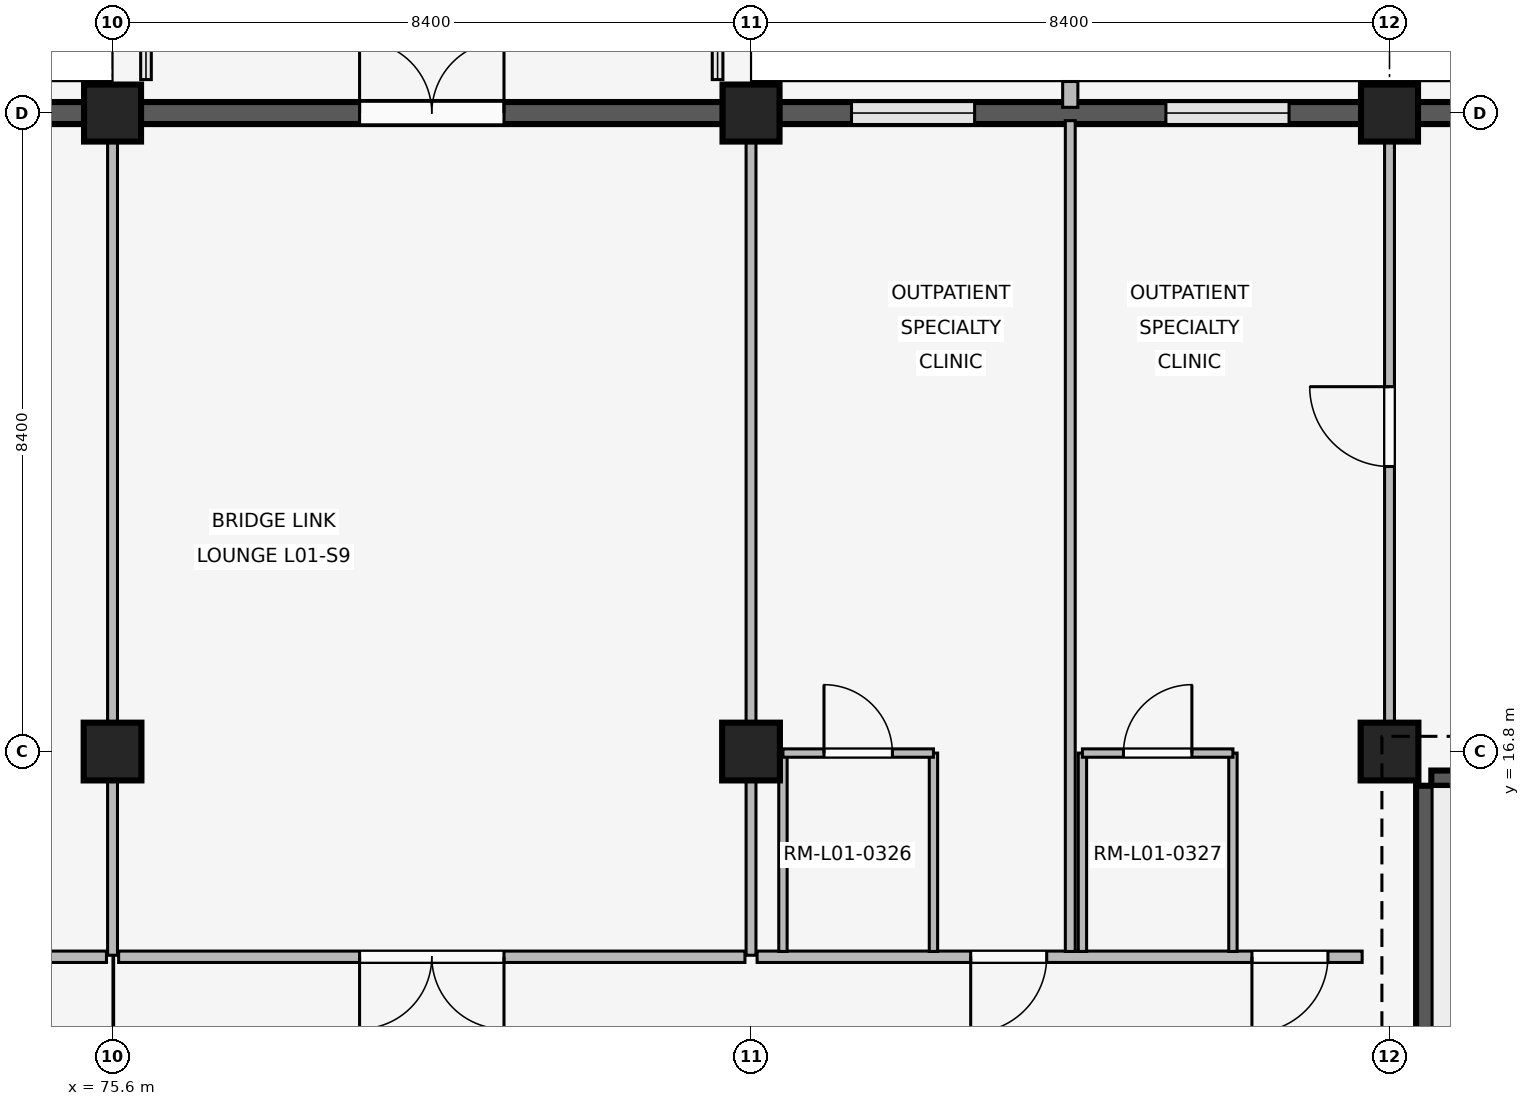
"""IFC4 building model, lengths in metres.
Left out: names, types, materials, properties, quantities, classifications, styles, units other than length and angle.
Written with IfcOpenShell. Run it as: python <this file> out.ifc"""

import sys

from ifc_helpers import new_model, si_unit, direction, frame, frame_2d, origin, origin_2d, place, context, subcontext, project, spatial, rectangle, extrude, element, fill, save


model = new_model("IFC4")
c1 = context("Model", 3, precision=1e-05, world=origin(), true_north=direction((0.0, 1.0)))
c2 = subcontext(c1, "Body", "Model", "MODEL_VIEW")
j1 = project(units=[si_unit("LENGTHUNIT", "METRE"), si_unit("PLANEANGLEUNIT", "RADIAN")], contexts=[c1])
p1 = place(None, origin())
s1 = spatial("IfcSite", under=j1, at=p1, CompositionType="ELEMENT")
p2 = place(p1, origin())
s2 = spatial("IfcBuilding", under=s1, at=p2, CompositionType="ELEMENT")
p3 = place(p2, frame((0.0, 0.0, 4.8)))
s3 = spatial("IfcBuildingStorey", under=s2, at=p3, CompositionType="ELEMENT", Elevation=4.8)
p4 = place(p3, frame((75.6, 16.8, 0.0), z_axis=(0.0, 0.0, 1.0), x_axis=(1.0, 0.0, 0.0)))
e1 = element("IfcColumn", 1, at=p4, inside=s3, PredefinedType="COLUMN", context=c2, shape_type="SweptSolid", body=[
    extrude(rectangle(XDim=0.76, YDim=0.76, at=origin_2d()), origin(), (0.0, 0.0, 1.0), 3.3),
])
p5 = place(p3, frame((75.6, 25.2, 0.0), z_axis=(0.0, 0.0, 1.0), x_axis=(1.0, 0.0, 0.0)))
e2 = element("IfcColumn", 2, at=p5, inside=s3, PredefinedType="COLUMN", context=c2, shape_type="SweptSolid", body=[
    extrude(rectangle(XDim=0.75, YDim=0.75, at=origin_2d()), origin(), (0.0, 0.0, 1.0), 3.3),
])
p6 = place(p3, frame((84.0, 16.8, 0.0), z_axis=(0.0, 0.0, 1.0), x_axis=(1.0, 0.0, 0.0)))
e3 = element("IfcColumn", 3, at=p6, inside=s3, PredefinedType="COLUMN", context=c2, shape_type="SweptSolid", body=[
    extrude(rectangle(XDim=0.76, YDim=0.76, at=origin_2d()), origin(), (0.0, 0.0, 1.0), 3.3),
])
p7 = place(p3, frame((84.0, 25.2, 0.0), z_axis=(0.0, 0.0, 1.0), x_axis=(1.0, 0.0, 0.0)))
e4 = element("IfcColumn", 4, at=p7, inside=s3, PredefinedType="COLUMN", context=c2, shape_type="SweptSolid", body=[
    extrude(rectangle(XDim=0.75, YDim=0.75, at=origin_2d()), origin(), (0.0, 0.0, 1.0), 3.3),
])
p8 = place(p3, frame((92.4, 16.8, 0.0), z_axis=(0.0, 0.0, 1.0), x_axis=(1.0, 0.0, 0.0)))
e5 = element("IfcColumn", 5, at=p8, inside=s3, PredefinedType="COLUMN", context=c2, shape_type="SweptSolid", body=[
    extrude(rectangle(XDim=0.76, YDim=0.76, at=origin_2d()), origin(), (0.0, 0.0, 1.0), 3.3),
])
p9 = place(p3, frame((92.4, 25.2, 0.0), z_axis=(0.0, 0.0, 1.0), x_axis=(1.0, 0.0, 0.0)))
e6 = element("IfcColumn", 6, at=p9, inside=s3, PredefinedType="COLUMN", context=c2, shape_type="SweptSolid", body=[
    extrude(rectangle(XDim=0.75, YDim=0.75, at=origin_2d()), origin(), (0.0, 0.0, 1.0), 3.3),
])
p10 = place(p3, frame((67.57, 25.2, 0.0), z_axis=(0.0, 0.0, 1.0), x_axis=(1.0, 0.0, 0.0)))
e7 = element("IfcWall", 7, at=p10, inside=s3, PredefinedType="SOLIDWALL", context=c2, shape_type="SweptSolid", body=[
    extrude(rectangle(XDim=7.66, YDim=0.29, at=frame_2d((3.83, 0.0))), origin(), (0.0, 0.0, 1.0), 2.42),
])
p11 = place(p10, frame((0.952, 0.0, 0.85)))
e8 = element("IfcOpeningElement", 8, at=p11, cuts=e7, PredefinedType="OPENING", context=c2, shape_type="SweptSolid", body=[
    extrude(rectangle(XDim=1.62, YDim=0.95, at=frame_2d((0.81, 0.475))), frame((0.0, 0.155, 0.0), z_axis=(0.0, -1.0, 0.0), x_axis=(1.0, 0.0, 0.0)), (0.0, 0.0, 1.0), 0.31),
])
p12 = place(p10, frame((5.088, 0.0, 0.85)))
e9 = element("IfcOpeningElement", 9, at=p12, cuts=e7, PredefinedType="OPENING", context=c2, shape_type="SweptSolid", body=[
    extrude(rectangle(XDim=1.62, YDim=0.95, at=frame_2d((0.81, 0.475))), frame((0.0, 0.155, 0.0), z_axis=(0.0, -1.0, 0.0), x_axis=(1.0, 0.0, 0.0)), (0.0, 0.0, 1.0), 0.31),
])
p13 = place(p3, frame((75.97, 25.2, 0.0), z_axis=(0.0, 0.0, 1.0), x_axis=(1.0, 0.0, 0.0)))
e10 = element("IfcWall", 10, at=p13, inside=s3, PredefinedType="SOLIDWALL", context=c2, shape_type="SweptSolid", body=[
    extrude(rectangle(XDim=7.66, YDim=0.29, at=frame_2d((3.83, 0.0))), origin(), (0.0, 0.0, 1.0), 2.42),
])
p14 = place(p13, frame((2.88, 0.0, 0.0)))
e11 = element("IfcOpeningElement", 11, at=p14, cuts=e10, PredefinedType="OPENING", context=c2, shape_type="SweptSolid", body=[
    extrude(rectangle(XDim=1.9, YDim=2.3, at=frame_2d((0.95, 1.15))), frame((0.0, 0.155, 0.0), z_axis=(0.0, -1.0, 0.0), x_axis=(1.0, 0.0, 0.0)), (0.0, 0.0, 1.0), 0.31),
])
p15 = place(p3, frame((84.37, 25.2, 0.0), z_axis=(0.0, 0.0, 1.0), x_axis=(1.0, 0.0, 0.0)))
e12 = element("IfcWall", 12, at=p15, inside=s3, PredefinedType="SOLIDWALL", context=c2, shape_type="SweptSolid", body=[
    extrude(rectangle(XDim=7.66, YDim=0.29, at=frame_2d((3.83, 0.0))), origin(), (0.0, 0.0, 1.0), 2.42),
])
p16 = place(p15, frame((0.952, 0.0, 0.85)))
e13 = element("IfcOpeningElement", 13, at=p16, cuts=e12, PredefinedType="OPENING", context=c2, shape_type="SweptSolid", body=[
    extrude(rectangle(XDim=1.62, YDim=0.95, at=frame_2d((0.81, 0.475))), frame((0.0, 0.155, 0.0), z_axis=(0.0, -1.0, 0.0), x_axis=(1.0, 0.0, 0.0)), (0.0, 0.0, 1.0), 0.31),
])
p17 = place(p15, frame((5.088, 0.0, 0.85)))
e14 = element("IfcOpeningElement", 14, at=p17, cuts=e12, PredefinedType="OPENING", context=c2, shape_type="SweptSolid", body=[
    extrude(rectangle(XDim=1.62, YDim=0.95, at=frame_2d((0.81, 0.475))), frame((0.0, 0.155, 0.0), z_axis=(0.0, -1.0, 0.0), x_axis=(1.0, 0.0, 0.0)), (0.0, 0.0, 1.0), 0.31),
])
p18 = place(p3, frame((88.2, 25.275, 0.0), z_axis=(0.0, 0.0, 1.0), x_axis=(0.0, 1.0, 0.0)))
e15 = element("IfcWall", 15, at=p18, inside=s3, PredefinedType="ELEMENTEDWALL", context=c2, shape_type="SweptSolid", body=[
    extrude(rectangle(XDim=0.34, YDim=0.2, at=frame_2d((0.17, 0.0))), origin(), (0.0, 0.0, 1.0), 2.4),
])
p19 = place(p3, frame((92.77, 25.2, 0.0), z_axis=(0.0, 0.0, 1.0), x_axis=(1.0, 0.0, 0.0)))
e16 = element("IfcWall", 16, at=p19, inside=s3, PredefinedType="SOLIDWALL", context=c2, shape_type="SweptSolid", body=[
    extrude(rectangle(XDim=7.66, YDim=0.29, at=frame_2d((3.83, 0.0))), origin(), (0.0, 0.0, 1.0), 2.42),
])
p20 = place(p19, frame((1.032, 0.0, 0.85)))
e17 = element("IfcOpeningElement", 17, at=p20, cuts=e16, PredefinedType="OPENING", context=c2, shape_type="SweptSolid", body=[
    extrude(rectangle(XDim=1.46, YDim=0.85, at=frame_2d((0.73, 0.425))), frame((0.0, 0.155, 0.0), z_axis=(0.0, -1.0, 0.0), x_axis=(1.0, 0.0, 0.0)), (0.0, 0.0, 1.0), 0.31),
])
p21 = place(p19, frame((5.168, 0.0, 0.85)))
e18 = element("IfcOpeningElement", 18, at=p21, cuts=e16, PredefinedType="OPENING", context=c2, shape_type="SweptSolid", body=[
    extrude(rectangle(XDim=1.46, YDim=0.85, at=frame_2d((0.73, 0.425))), frame((0.0, 0.155, 0.0), z_axis=(0.0, -1.0, 0.0), x_axis=(1.0, 0.0, 0.0)), (0.0, 0.0, 1.0), 0.31),
])
p22 = place(p3, frame((92.95, 16.35, 0.0), z_axis=(0.0, 0.0, 1.0), x_axis=(1.0, 0.0, 0.0)))
e19 = element("IfcWall", 19, at=p22, inside=s3, PredefinedType="SHEAR", context=c2, shape_type="SweptSolid", body=[
    extrude(rectangle(XDim=7.5, YDim=0.4, at=frame_2d((3.75, 0.0))), origin(), (0.0, 0.0, 1.0), 3.02),
])
p23 = place(p3, frame((92.95, 8.8, 0.0), z_axis=(0.0, 0.0, 1.0), x_axis=(0.0, 1.0, 0.0)))
e20 = element("IfcWall", 20, at=p23, inside=s3, PredefinedType="SHEAR", context=c2, shape_type="SweptSolid", body=[
    extrude(rectangle(XDim=7.55, YDim=0.4, at=frame_2d((3.775, 0.0))), origin(), (0.0, 0.0, 1.0), 3.02),
])
p24 = place(p23, frame((0.28, 0.0, 0.0)))
e21 = element("IfcOpeningElement", 21, at=p24, cuts=e20, PredefinedType="OPENING", context=c2, shape_type="SweptSolid", body=[
    extrude(rectangle(XDim=1.0, YDim=2.15, at=frame_2d((0.5, 1.075))), frame((0.0, 0.21, 0.0), z_axis=(0.0, -1.0, 0.0), x_axis=(1.0, 0.0, 0.0)), (0.0, 0.0, 1.0), 0.42),
])
p25 = place(p3, frame((75.52, 14.1, 0.0), z_axis=(0.0, 0.0, 1.0), x_axis=(-1.0, 0.0, 0.0)))
e22 = element("IfcWall", 22, at=p25, inside=s3, PredefinedType="PARTITIONING", context=c2, shape_type="SweptSolid", body=[
    extrude(rectangle(XDim=8.24, YDim=0.15, at=frame_2d((4.12, 0.0))), origin(), (0.0, 0.0, 1.0), 2.4),
])
p26 = place(p25, frame((3.57, 0.0, 0.0)))
e23 = element("IfcOpeningElement", 23, at=p26, cuts=e22, PredefinedType="OPENING", context=c2, shape_type="SweptSolid", body=[
    extrude(rectangle(XDim=1.1, YDim=2.2, at=frame_2d((0.55, 1.1))), frame((0.0, 0.085, 0.0), z_axis=(0.0, -1.0, 0.0), x_axis=(1.0, 0.0, 0.0)), (0.0, 0.0, 1.0), 0.17),
])
p27 = place(p3, frame((75.6, 14.12, 0.0), z_axis=(0.0, 0.0, 1.0), x_axis=(0.0, 1.0, 0.0)))
e24 = element("IfcWall", 24, at=p27, inside=s3, PredefinedType="PARTITIONING", context=c2, shape_type="SweptSolid", body=[
    extrude(rectangle(XDim=10.94, YDim=0.13, at=frame_2d((5.47, 0.0))), origin(), (0.0, 0.0, 1.0), 2.4),
])
p28 = place(p3, frame((83.92, 14.1, 0.0), z_axis=(0.0, 0.0, 1.0), x_axis=(-1.0, 0.0, 0.0)))
e25 = element("IfcWall", 25, at=p28, inside=s3, PredefinedType="PARTITIONING", context=c2, shape_type="SweptSolid", body=[
    extrude(rectangle(XDim=8.24, YDim=0.15, at=frame_2d((4.12, 0.0))), origin(), (0.0, 0.0, 1.0), 2.4),
])
p29 = place(p28, frame((3.17, 0.0, 0.0)))
e26 = element("IfcOpeningElement", 26, at=p29, cuts=e25, PredefinedType="OPENING", context=c2, shape_type="SweptSolid", body=[
    extrude(rectangle(XDim=1.9, YDim=2.3, at=frame_2d((0.95, 1.15))), frame((0.0, 0.085, 0.0), z_axis=(0.0, -1.0, 0.0), x_axis=(1.0, 0.0, 0.0)), (0.0, 0.0, 1.0), 0.17),
])
p30 = place(p3, frame((84.0, 14.12, 0.0), z_axis=(0.0, 0.0, 1.0), x_axis=(0.0, 1.0, 0.0)))
e27 = element("IfcWall", 27, at=p30, inside=s3, PredefinedType="PARTITIONING", context=c2, shape_type="SweptSolid", body=[
    extrude(rectangle(XDim=10.94, YDim=0.13, at=frame_2d((5.47, 0.0))), origin(), (0.0, 0.0, 1.0), 2.4),
])
p31 = place(p3, frame((92.04, 14.1, 0.0), z_axis=(0.0, 0.0, 1.0), x_axis=(-1.0, 0.0, 0.0)))
e28 = element("IfcWall", 28, at=p31, inside=s3, PredefinedType="PARTITIONING", context=c2, shape_type="SweptSolid", body=[
    extrude(rectangle(XDim=7.96, YDim=0.15, at=frame_2d((3.98, 0.0))), origin(), (0.0, 0.0, 1.0), 2.4),
])
p32 = place(p31, frame((0.45, 0.0, 0.0)))
e29 = element("IfcOpeningElement", 29, at=p32, cuts=e28, PredefinedType="OPENING", context=c2, shape_type="SweptSolid", body=[
    extrude(rectangle(XDim=1.0, YDim=2.15, at=frame_2d((0.5, 1.075))), frame((0.0, 0.085, 0.0), z_axis=(0.0, -1.0, 0.0), x_axis=(1.0, 0.0, 0.0)), (0.0, 0.0, 1.0), 0.17),
])
p33 = place(p31, frame((4.15, 0.0, 0.0)))
e30 = element("IfcOpeningElement", 30, at=p33, cuts=e28, PredefinedType="OPENING", context=c2, shape_type="SweptSolid", body=[
    extrude(rectangle(XDim=1.0, YDim=2.15, at=frame_2d((0.5, 1.075))), frame((0.0, 0.085, 0.0), z_axis=(0.0, -1.0, 0.0), x_axis=(1.0, 0.0, 0.0)), (0.0, 0.0, 1.0), 0.17),
])
p34 = place(p3, frame((88.2, 14.17, 0.0), z_axis=(0.0, 0.0, 1.0), x_axis=(0.0, 1.0, 0.0)))
e31 = element("IfcWall", 31, at=p34, inside=s3, PredefinedType="PARTITIONING", context=c2, shape_type="SweptSolid", body=[
    extrude(rectangle(XDim=10.93, YDim=0.13, at=frame_2d((5.465, 0.0))), origin(), (0.0, 0.0, 1.0), 2.4),
])
for number, where, z_axis, x_axis in (
    (32, (84.42, 14.17, 0.0), (0.0, 0.0, 1.0), (0.0, 1.0, 0.0)),
    (33, (86.4, 14.17, 0.0), (0.0, 0.0, 1.0), (0.0, 1.0, 0.0)),
):
    element("IfcWall", number, at=place(p3, frame(where, z_axis=z_axis, x_axis=x_axis)), inside=s3, PredefinedType="PARTITIONING", context=c2, shape_type="SweptSolid", body=[
        extrude(rectangle(XDim=2.61, YDim=0.11, at=frame_2d((1.305, 0.0))), origin(), (0.0, 0.0, 1.0), 2.4),
    ])
p35 = place(p3, frame((84.42, 16.78, 0.0), z_axis=(0.0, 0.0, 1.0), x_axis=(1.0, 0.0, 0.0)))
e34 = element("IfcWall", 34, at=p35, inside=s3, PredefinedType="PARTITIONING", context=c2, shape_type="SweptSolid", body=[
    extrude(rectangle(XDim=1.98, YDim=0.11, at=frame_2d((0.99, 0.0))), origin(), (0.0, 0.0, 1.0), 2.4),
])
p36 = place(p35, frame((0.54, 0.0, 0.0)))
e35 = element("IfcOpeningElement", 35, at=p36, cuts=e34, PredefinedType="OPENING", context=c2, shape_type="SweptSolid", body=[
    extrude(rectangle(XDim=0.9, YDim=2.1, at=frame_2d((0.45, 1.05))), frame((0.0, 0.065, 0.0), z_axis=(0.0, -1.0, 0.0), x_axis=(1.0, 0.0, 0.0)), (0.0, 0.0, 1.0), 0.13),
])
for number, where, z_axis, x_axis in (
    (36, (88.36, 14.17, 0.0), (0.0, 0.0, 1.0), (0.0, 1.0, 0.0)),
    (37, (90.34, 14.17, 0.0), (0.0, 0.0, 1.0), (0.0, 1.0, 0.0)),
):
    element("IfcWall", number, at=place(p3, frame(where, z_axis=z_axis, x_axis=x_axis)), inside=s3, PredefinedType="PARTITIONING", context=c2, shape_type="SweptSolid", body=[
        extrude(rectangle(XDim=2.61, YDim=0.11, at=frame_2d((1.305, 0.0))), origin(), (0.0, 0.0, 1.0), 2.4),
    ])
p37 = place(p3, frame((88.36, 16.78, 0.0), z_axis=(0.0, 0.0, 1.0), x_axis=(1.0, 0.0, 0.0)))
e38 = element("IfcWall", 38, at=p37, inside=s3, PredefinedType="PARTITIONING", context=c2, shape_type="SweptSolid", body=[
    extrude(rectangle(XDim=1.98, YDim=0.11, at=frame_2d((0.99, 0.0))), origin(), (0.0, 0.0, 1.0), 2.4),
])
p38 = place(p37, frame((0.54, 0.0, 0.0)))
e39 = element("IfcOpeningElement", 39, at=p38, cuts=e38, PredefinedType="OPENING", context=c2, shape_type="SweptSolid", body=[
    extrude(rectangle(XDim=0.9, YDim=2.1, at=frame_2d((0.45, 1.05))), frame((0.0, 0.065, 0.0), z_axis=(0.0, -1.0, 0.0), x_axis=(1.0, 0.0, 0.0)), (0.0, 0.0, 1.0), 0.13),
])
p39 = place(p3, frame((92.4, 17.15, 0.0), z_axis=(0.0, 0.0, 1.0), x_axis=(0.0, 1.0, 0.0)))
e40 = element("IfcWall", 40, at=p39, inside=s3, PredefinedType="PARTITIONING", context=c2, shape_type="SweptSolid", body=[
    extrude(rectangle(XDim=7.91, YDim=0.13, at=frame_2d((3.955, 0.0))), origin(), (0.0, 0.0, 1.0), 2.4),
])
p40 = place(p39, frame((3.4, 0.0, 0.0)))
e41 = element("IfcOpeningElement", 41, at=p40, cuts=e40, PredefinedType="OPENING", context=c2, shape_type="SweptSolid", body=[
    extrude(rectangle(XDim=1.05, YDim=2.2, at=frame_2d((0.525, 1.1))), frame((0.0, 0.075, 0.0), z_axis=(0.0, -1.0, 0.0), x_axis=(1.0, 0.0, 0.0)), (0.0, 0.0, 1.0), 0.15),
])
p41 = place(p14, origin())
e42 = element("IfcDoor", 42, at=p41, inside=s3, OperationType="DOUBLE_SWING_LEFT", PredefinedType="DOOR", context=c2, shape_type="SweptSolid", body=[
    extrude(rectangle(XDim=1.9, YDim=2.3, at=frame_2d((0.95, 1.15))), frame((0.0, 0.025, 0.0), z_axis=(0.0, -1.0, 0.0), x_axis=(1.0, 0.0, 0.0)), (0.0, 0.0, 1.0), 0.05),
])
fill(e11, e42)
p42 = place(p16, origin())
e43 = element("IfcWindow", 43, at=p42, inside=s3, PartitioningType="SINGLE_PANEL", PredefinedType="WINDOW", context=c2, shape_type="SweptSolid", body=[
    extrude(rectangle(XDim=1.62, YDim=0.95, at=frame_2d((0.81, 0.475))), frame((0.0, 0.03, 0.0), z_axis=(0.0, -1.0, 0.0), x_axis=(1.0, 0.0, 0.0)), (0.0, 0.0, 1.0), 0.06),
])
fill(e13, e43)
p43 = place(p17, origin())
e44 = element("IfcWindow", 44, at=p43, inside=s3, PartitioningType="SINGLE_PANEL", PredefinedType="WINDOW", context=c2, shape_type="SweptSolid", body=[
    extrude(rectangle(XDim=1.62, YDim=0.95, at=frame_2d((0.81, 0.475))), frame((0.0, 0.03, 0.0), z_axis=(0.0, -1.0, 0.0), x_axis=(1.0, 0.0, 0.0)), (0.0, 0.0, 1.0), 0.06),
])
fill(e14, e44)
p44 = place(p29, origin())
e45 = element("IfcDoor", 45, at=p44, inside=s3, OperationType="DOUBLE_SWING_LEFT", PredefinedType="DOOR", context=c2, shape_type="SweptSolid", body=[
    extrude(rectangle(XDim=1.9, YDim=2.3, at=frame_2d((0.95, 1.15))), frame((0.0, 0.025, 0.0), z_axis=(0.0, -1.0, 0.0), x_axis=(1.0, 0.0, 0.0)), (0.0, 0.0, 1.0), 0.05),
])
fill(e26, e45)
p45 = place(p32, origin())
e46 = element("IfcDoor", 46, at=p45, inside=s3, OperationType="SINGLE_SWING_RIGHT", PredefinedType="DOOR", context=c2, shape_type="SweptSolid", body=[
    extrude(rectangle(XDim=1.0, YDim=2.15, at=frame_2d((0.5, 1.075))), frame((0.0, 0.025, 0.0), z_axis=(0.0, -1.0, 0.0), x_axis=(1.0, 0.0, 0.0)), (0.0, 0.0, 1.0), 0.05),
])
fill(e29, e46)
p46 = place(p33, origin())
e47 = element("IfcDoor", 47, at=p46, inside=s3, OperationType="SINGLE_SWING_RIGHT", PredefinedType="DOOR", context=c2, shape_type="SweptSolid", body=[
    extrude(rectangle(XDim=1.0, YDim=2.15, at=frame_2d((0.5, 1.075))), frame((0.0, 0.025, 0.0), z_axis=(0.0, -1.0, 0.0), x_axis=(1.0, 0.0, 0.0)), (0.0, 0.0, 1.0), 0.05),
])
fill(e30, e47)
p47 = place(p36, origin())
e48 = element("IfcDoor", 48, at=p47, inside=s3, OperationType="SINGLE_SWING_LEFT", PredefinedType="DOOR", context=c2, shape_type="SweptSolid", body=[
    extrude(rectangle(XDim=0.9, YDim=2.1, at=frame_2d((0.45, 1.05))), frame((0.0, 0.025, 0.0), z_axis=(0.0, -1.0, 0.0), x_axis=(1.0, 0.0, 0.0)), (0.0, 0.0, 1.0), 0.05),
])
fill(e35, e48)
p48 = place(p38, origin())
e49 = element("IfcDoor", 49, at=p48, inside=s3, OperationType="SINGLE_SWING_RIGHT", PredefinedType="DOOR", context=c2, shape_type="SweptSolid", body=[
    extrude(rectangle(XDim=0.9, YDim=2.1, at=frame_2d((0.45, 1.05))), frame((0.0, 0.025, 0.0), z_axis=(0.0, -1.0, 0.0), x_axis=(1.0, 0.0, 0.0)), (0.0, 0.0, 1.0), 0.05),
])
fill(e39, e49)
p49 = place(p40, origin())
e50 = element("IfcDoor", 50, at=p49, inside=s3, OperationType="SINGLE_SWING_RIGHT", PredefinedType="DOOR", context=c2, shape_type="SweptSolid", body=[
    extrude(rectangle(XDim=1.05, YDim=2.2, at=frame_2d((0.525, 1.1))), frame((0.0, 0.025, 0.0), z_axis=(0.0, -1.0, 0.0), x_axis=(1.0, 0.0, 0.0)), (0.0, 0.0, 1.0), 0.05),
])
fill(e41, e50)
save(model, sys.argv[1])
